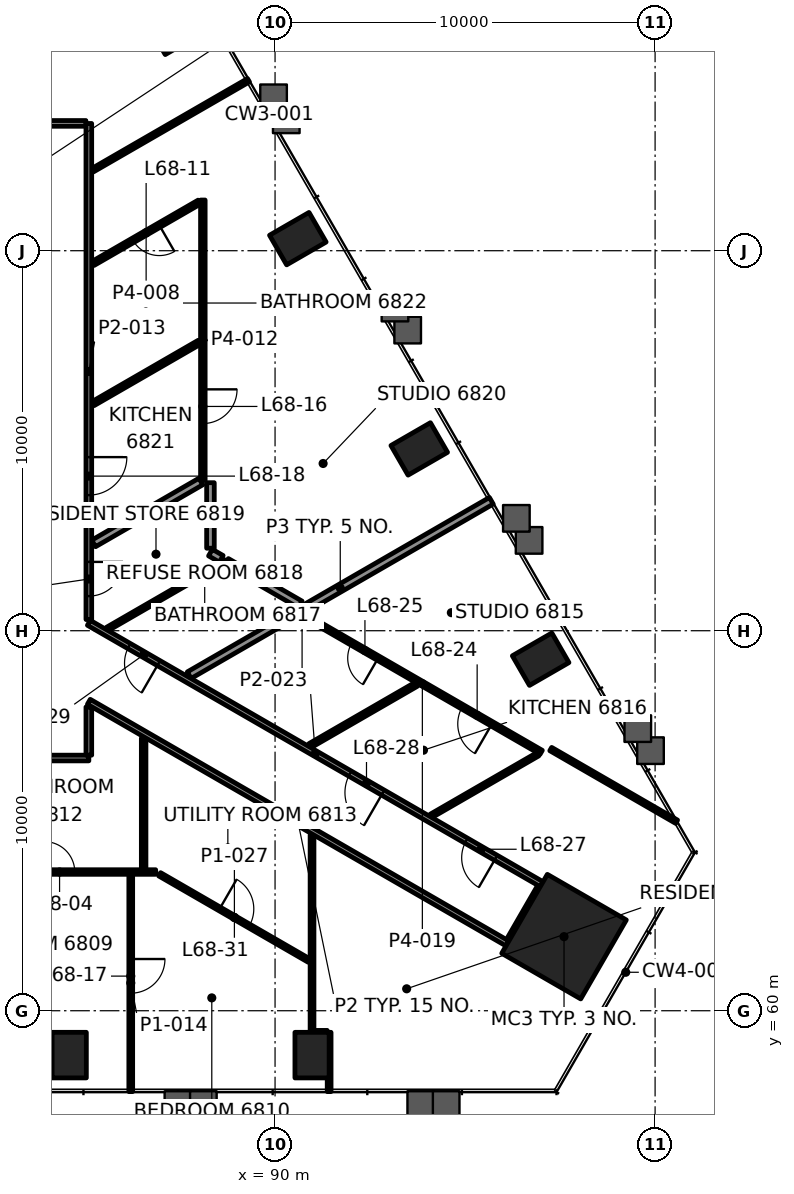
"""IFC4 building model, lengths in metres.
Left out: names, types, materials, properties, quantities, classifications, styles, units other than length and angle.
Written with IfcOpenShell. Run it as: python <this file> out.ifc"""

import sys

from ifc_helpers import new_model, si_unit, direction, frame, frame_2d, origin, origin_2d, place, context, subcontext, project, spatial, rectangle, hollow_rectangle, extrude, element, fill, save


model = new_model("IFC4")
c1 = context("Model", 3, precision=1e-05, world=origin(), true_north=direction((0.0, 1.0)))
c2 = subcontext(c1, "Body", "Model", "MODEL_VIEW")
j1 = project(units=[si_unit("LENGTHUNIT", "METRE"), si_unit("PLANEANGLEUNIT", "RADIAN")], contexts=[c1])
p1 = place(None, origin())
s1 = spatial("IfcSite", under=j1, at=p1, CompositionType="ELEMENT")
p2 = place(p1, origin())
s2 = spatial("IfcBuilding", under=s1, at=p2, CompositionType="ELEMENT")
p3 = place(p2, frame((0.0, 0.0, 284.6)))
s3 = spatial("IfcBuildingStorey", under=s2, at=p3, CompositionType="ELEMENT", Elevation=284.6)
p4 = place(p3, frame((97.604, 61.95, 0.0), z_axis=(0.0, 0.0, 1.0), x_axis=(0.5, 0.866025403784, 0.0)))
e1 = element("IfcColumn", 1, at=p4, inside=s3, PredefinedType="COLUMN", context=c2, shape_type="SweptSolid", body=[
    extrude(rectangle(XDim=2.4, YDim=2.4, at=origin_2d()), origin(), (0.0, 0.0, 1.0), 3.5),
])
for number, where, z_axis, x_axis in (
    (2, (84.584, 58.832, -0.0), (0.0, 0.0, 1.0), (1.0, 0.0, 0.0)),
    (3, (90.973, 58.832, -0.0), (0.0, 0.0, 1.0), (1.0, 0.0, 0.0)),
    (4, (96.989, 69.251, -0.0), (0.0, 0.0, 1.0), (-0.5, 0.866, 0.0)),
    (5, (93.794, 74.784, -0.0), (0.0, 0.0, 1.0), (-0.5, 0.866, 0.0)),
    (6, (90.599, 80.317, -0.0), (0.0, 0.0, 1.0), (-0.5, 0.866, 0.0)),
    (7, (87.405, 85.851, -0.0), (0.0, 0.0, 1.0), (-0.5, 0.866, 0.0)),
):
    element("IfcColumn", number, at=place(p3, frame(where, z_axis=z_axis, x_axis=x_axis)), inside=s3, PredefinedType="COLUMN", context=c2, shape_type="SweptSolid", body=[
        extrude(hollow_rectangle(XDim=0.9, YDim=1.2, WallThickness=0.06, at=origin_2d()), origin(), (0.0, 0.0, 1.0), 3.5),
    ])
p5 = place(p3, frame((91.023, 59.432, 0.0), z_axis=(0.0, 0.0, 1.0), x_axis=(1.0, 0.0, 0.0)))
e8 = element("IfcWall", 8, at=p5, inside=s3, PredefinedType="PARTITIONING", context=c2, shape_type="SweptSolid", body=[
    extrude(rectangle(XDim=0.349, YDim=0.1, at=frame_2d((0.175, 0.0))), origin(), (0.0, 0.0, 1.0), 2.7),
])
p6 = place(p3, frame((73.935, 63.65, 0.0), z_axis=(0.0, 0.0, 1.0), x_axis=(1.0, 0.0, 0.0)))
e9 = element("IfcWall", 9, at=p6, inside=s3, PredefinedType="PARTITIONING", context=c2, shape_type="SweptSolid", body=[
    extrude(rectangle(XDim=12.924, YDim=0.12, at=frame_2d((6.462, 0.0))), origin(), (0.0, 0.0, 1.0), 2.7),
])
p7 = place(p6, frame((6.197, 0.0, 0.0)))
e10 = element("IfcOpeningElement", 10, at=p7, cuts=e9, PredefinedType="OPENING", context=c2, shape_type="SweptSolid", body=[
    extrude(rectangle(XDim=0.9, YDim=2.1, at=frame_2d((0.45, 1.05))), frame((0.0, 0.07, 0.0), z_axis=(0.0, -1.0, 0.0), x_axis=(1.0, 0.0, 0.0)), (0.0, 0.0, 1.0), 0.14),
])
p8 = place(p6, frame((9.995, 0.0, 0.0)))
e11 = element("IfcOpeningElement", 11, at=p8, cuts=e9, PredefinedType="OPENING", context=c2, shape_type="SweptSolid", body=[
    extrude(rectangle(XDim=0.8, YDim=2.1, at=frame_2d((0.4, 1.05))), frame((0.0, 0.07, 0.0), z_axis=(0.0, -1.0, 0.0), x_axis=(1.0, 0.0, 0.0)), (0.0, 0.0, 1.0), 0.14),
])
p9 = place(p3, frame((85.1, 66.65, 0.0), z_axis=(0.0, 0.0, 1.0), x_axis=(-1.0, 0.0, 0.0)))
e12 = element("IfcWall", 12, at=p9, inside=s3, PredefinedType="PARTITIONING", context=c2, shape_type="SweptSolid", body=[
    extrude(rectangle(XDim=20.2, YDim=0.15, at=frame_2d((10.1, 0.0))), origin(), (0.0, 0.0, 1.0), 2.7),
])
p10 = place(p9, frame((6.405, 0.0, 0.0)))
e13 = element("IfcOpeningElement", 13, at=p10, cuts=e12, PredefinedType="OPENING", context=c2, shape_type="SweptSolid", body=[
    extrude(rectangle(XDim=1.0, YDim=2.1, at=frame_2d((0.5, 1.05))), frame((0.0, 0.085, 0.0), z_axis=(0.0, -1.0, 0.0), x_axis=(1.0, 0.0, 0.0)), (0.0, 0.0, 1.0), 0.17),
])
p11 = place(p9, frame((12.845, 0.0, 0.0)))
e14 = element("IfcOpeningElement", 14, at=p11, cuts=e12, PredefinedType="OPENING", context=c2, shape_type="SweptSolid", body=[
    extrude(rectangle(XDim=0.9, YDim=2.1, at=frame_2d((0.45, 1.05))), frame((0.0, 0.085, 0.0), z_axis=(0.0, -1.0, 0.0), x_axis=(1.0, 0.0, 0.0)), (0.0, 0.0, 1.0), 0.17),
])
p12 = place(p3, frame((78.2, 83.35, 0.0), z_axis=(0.0, 0.0, 1.0), x_axis=(1.0, 0.0, 0.0)))
e15 = element("IfcWall", 15, at=p12, inside=s3, PredefinedType="PARTITIONING", context=c2, shape_type="SweptSolid", body=[
    extrude(rectangle(XDim=6.823, YDim=0.15, at=frame_2d((3.412, 0.0))), origin(), (0.0, 0.0, 1.0), 2.7),
])
p13 = place(p12, frame((2.961, 0.0, 0.0)))
e16 = element("IfcOpeningElement", 16, at=p13, cuts=e15, PredefinedType="OPENING", context=c2, shape_type="SweptSolid", body=[
    extrude(rectangle(XDim=0.9, YDim=2.1, at=frame_2d((0.45, 1.05))), frame((0.0, 0.085, 0.0), z_axis=(0.0, -1.0, 0.0), x_axis=(1.0, 0.0, 0.0)), (0.0, 0.0, 1.0), 0.17),
])
p14 = place(p3, frame((94.104, 65.126, 0.0), z_axis=(0.0, 0.0, 1.0), x_axis=(0.866000336211, 0.500043415797, 0.0)))
e17 = element("IfcWall", 17, at=p14, inside=s3, PredefinedType="PARTITIONING", context=c2, shape_type="SweptSolid", body=[
    extrude(rectangle(XDim=3.248, YDim=0.1, at=frame_2d((1.624, 0.0))), origin(), (0.0, 0.0, 1.0), 2.7),
])
p15 = place(p3, frame((90.918, 66.975, 0.0), z_axis=(0.0, 0.0, 1.0), x_axis=(0.86605210011, 0.499953757757, 0.0)))
e18 = element("IfcWall", 18, at=p15, inside=s3, PredefinedType="PARTITIONING", context=c2, shape_type="SweptSolid", body=[
    extrude(rectangle(XDim=3.228, YDim=0.12, at=frame_2d((1.614, 0.0))), origin(), (0.0, 0.0, 1.0), 2.7),
])
p16 = place(p3, frame((87.741, 68.83, 0.0), z_axis=(0.0, 0.0, 1.0), x_axis=(0.866026579827, 0.499997963029, 0.0)))
e19 = element("IfcWall", 19, at=p16, inside=s3, PredefinedType="PARTITIONING", context=c2, shape_type="SweptSolid", body=[
    extrude(rectangle(XDim=9.179, YDim=0.2, at=frame_2d((4.59, 0.0))), origin(), (0.0, 0.0, 1.0), 2.688),
])
p17 = place(p3, frame((85.585, 70.045, 0.0), z_axis=(0.0, 0.0, 1.0), x_axis=(0.866004928679, 0.500035462246, 0.0)))
e20 = element("IfcWall", 20, at=p17, inside=s3, PredefinedType="PARTITIONING", context=c2, shape_type="SweptSolid", body=[
    extrude(rectangle(XDim=3.578, YDim=0.1, at=frame_2d((1.789, 0.0))), origin(), (0.0, 0.0, 1.0), 2.7),
])
p18 = place(p3, frame((85.227, 72.297, 0.0), z_axis=(0.0, 0.0, 1.0), x_axis=(0.866002113569, 0.500040337666, 0.0)))
e21 = element("IfcWall", 21, at=p18, inside=s3, PredefinedType="PARTITIONING", context=c2, shape_type="SweptSolid", body=[
    extrude(rectangle(XDim=3.258, YDim=0.2, at=frame_2d((1.629, 0.0))), origin(), (0.0, 0.0, 1.0), 2.7),
])
p19 = place(p3, frame((85.21, 75.976, 0.0), z_axis=(0.0, 0.0, 1.0), x_axis=(0.86605210011, 0.499953757757, 0.0)))
e22 = element("IfcWall", 22, at=p19, inside=s3, PredefinedType="PARTITIONING", context=c2, shape_type="SweptSolid", body=[
    extrude(rectangle(XDim=3.228, YDim=0.12, at=frame_2d((1.614, 0.0))), origin(), (0.0, 0.0, 1.0), 2.7),
])
p20 = place(p3, frame((88.005, 81.279, 0.0), z_axis=(0.0, 0.0, 1.0), x_axis=(-0.866000447062, -0.500043223821, 0.0)))
e23 = element("IfcWall", 23, at=p20, inside=s3, PredefinedType="PARTITIONING", context=c2, shape_type="SweptSolid", body=[
    extrude(rectangle(XDim=3.228, YDim=0.12, at=frame_2d((1.614, 0.0))), origin(), (0.0, 0.0, 1.0), 2.7),
])
p21 = place(p20, frame((1.214, 0.0, 0.0)))
e24 = element("IfcOpeningElement", 24, at=p21, cuts=e23, PredefinedType="OPENING", context=c2, shape_type="SweptSolid", body=[
    extrude(rectangle(XDim=0.8, YDim=2.1, at=frame_2d((0.4, 1.05))), frame((0.0, 0.07, 0.0), z_axis=(0.0, -1.0, 0.0), x_axis=(1.0, 0.0, 0.0)), (0.0, 0.0, 1.0), 0.14),
])
p22 = place(p3, frame((85.201, 82.119, 0.0), z_axis=(0.0, 0.0, 1.0), x_axis=(0.866035297817, 0.499982862641, 0.0)))
e25 = element("IfcWall", 25, at=p22, inside=s3, PredefinedType="PARTITIONING", context=c2, shape_type="SweptSolid", body=[
    extrude(rectangle(XDim=4.734, YDim=0.1, at=frame_2d((2.367, 0.0))), origin(), (0.0, 0.0, 1.0), 2.688),
])
p23 = place(p3, frame((96.153, 61.835, 0.0), z_axis=(0.0, 0.0, 1.0), x_axis=(0.500008692254, 0.866020385251, 0.0)))
e26 = element("IfcWall", 26, at=p23, inside=s3, PredefinedType="PARTITIONING", context=c2, shape_type="SweptSolid", body=[
    extrude(rectangle(XDim=1.649, YDim=0.15, at=frame_2d((0.824, 0.0))), origin(), (0.0, 0.0, 1.0), 2.547),
])
p24 = place(p3, frame((91.423, 57.872, 0.0), z_axis=(0.0, 0.0, 1.0), x_axis=(0.0, 1.0, 0.0)))
e27 = element("IfcWall", 27, at=p24, inside=s3, PredefinedType="PARTITIONING", context=c2, shape_type="SweptSolid", body=[
    extrude(rectangle(XDim=1.559, YDim=0.1, at=frame_2d((0.78, 0.0))), origin(), (0.0, 0.0, 1.0), 2.7),
])
p25 = place(p3, frame((90.973, 59.432, 0.0), z_axis=(0.0, 0.0, 1.0), x_axis=(0.0, 1.0, 0.0)))
e28 = element("IfcWall", 28, at=p25, inside=s3, PredefinedType="PARTITIONING", context=c2, shape_type="SweptSolid", body=[
    extrude(rectangle(XDim=5.19, YDim=0.1, at=frame_2d((2.595, 0.0))), origin(), (0.0, 0.0, 1.0), 2.7),
])
p26 = place(p3, frame((88.3, 72.171, 0.0), z_axis=(0.0, 0.0, 1.0), x_axis=(0.0, 1.0, 0.0)))
e29 = element("IfcWall", 29, at=p26, inside=s3, PredefinedType="PARTITIONING", context=c2, shape_type="SweptSolid", body=[
    extrude(rectangle(XDim=1.724, YDim=0.2, at=frame_2d((0.862, 0.0))), origin(), (0.0, 0.0, 1.0), 2.7),
])
p27 = place(p3, frame((88.1, 81.334, 0.0), z_axis=(0.0, 0.0, 1.0), x_axis=(0.0, -1.0, 0.0)))
e30 = element("IfcWall", 30, at=p27, inside=s3, PredefinedType="PARTITIONING", context=c2, shape_type="SweptSolid", body=[
    extrude(rectangle(XDim=7.378, YDim=0.12, at=frame_2d((3.689, 0.0))), origin(), (0.0, 0.0, 1.0), 2.7),
])
p28 = place(p27, frame((4.982, 0.0, 0.0)))
e31 = element("IfcOpeningElement", 31, at=p28, cuts=e30, PredefinedType="OPENING", context=c2, shape_type="SweptSolid", body=[
    extrude(rectangle(XDim=0.9, YDim=2.1, at=frame_2d((0.45, 1.05))), frame((0.0, 0.07, 0.0), z_axis=(0.0, -1.0, 0.0), x_axis=(1.0, 0.0, 0.0)), (0.0, 0.0, 1.0), 0.14),
])
p29 = place(p3, frame((86.542, 63.71, 0.0), z_axis=(0.0, 0.0, 1.0), x_axis=(0.0, 1.0, 0.0)))
e32 = element("IfcWall", 32, at=p29, inside=s3, PredefinedType="PARTITIONING", context=c2, shape_type="SweptSolid", body=[
    extrude(rectangle(XDim=3.46, YDim=0.12, at=frame_2d((1.73, 0.0))), origin(), (0.0, 0.0, 1.0), 2.547),
])
p30 = place(p3, frame((86.203, 63.59, 0.0), z_axis=(0.0, 0.0, 1.0), x_axis=(0.0, -1.0, 0.0)))
e33 = element("IfcWall", 33, at=p30, inside=s3, PredefinedType="PARTITIONING", context=c2, shape_type="SweptSolid", body=[
    extrude(rectangle(XDim=5.718, YDim=0.1, at=frame_2d((2.859, 0.0))), origin(), (0.0, 0.0, 1.0), 2.7),
])
p31 = place(p30, frame((2.229, 0.0, 0.0)))
e34 = element("IfcOpeningElement", 34, at=p31, cuts=e33, PredefinedType="OPENING", context=c2, shape_type="SweptSolid", body=[
    extrude(rectangle(XDim=0.9, YDim=2.1, at=frame_2d((0.45, 1.05))), frame((0.0, 0.06, 0.0), z_axis=(0.0, -1.0, 0.0), x_axis=(1.0, 0.0, 0.0)), (0.0, 0.0, 1.0), 0.12),
])
p32 = place(p3, frame((85.1, 66.725, 0.0), z_axis=(0.0, 0.0, 1.0), x_axis=(0.0, 1.0, 0.0)))
e35 = element("IfcWall", 35, at=p32, inside=s3, PredefinedType="PARTITIONING", context=c2, shape_type="SweptSolid", body=[
    extrude(rectangle(XDim=1.268, YDim=0.15, at=frame_2d((0.634, 0.0))), origin(), (0.0, 0.0, 1.0), 2.547),
])
p33 = place(p3, frame((85.1, 83.348, 0.0), z_axis=(0.0, 0.0, 1.0), x_axis=(0.0, -1.0, 0.0)))
e36 = element("IfcWall", 36, at=p33, inside=s3, PredefinedType="PARTITIONING", context=c2, shape_type="SweptSolid", body=[
    extrude(rectangle(XDim=13.053, YDim=0.15, at=frame_2d((6.527, 0.0))), origin(), (0.0, 0.0, 1.0), 2.7),
])
p34 = place(p33, frame((8.78, 0.0, 0.0)))
e37 = element("IfcOpeningElement", 37, at=p34, cuts=e36, PredefinedType="OPENING", context=c2, shape_type="SweptSolid", body=[
    extrude(rectangle(XDim=1.0, YDim=2.1, at=frame_2d((0.5, 1.05))), frame((0.0, 0.085, 0.0), z_axis=(0.0, -1.0, 0.0), x_axis=(1.0, 0.0, 0.0)), (0.0, 0.0, 1.0), 0.17),
])
p35 = place(p33, frame((11.537, 0.0, 0.0)))
e38 = element("IfcOpeningElement", 38, at=p35, cuts=e36, PredefinedType="OPENING", context=c2, shape_type="SweptSolid", body=[
    extrude(rectangle(XDim=0.9, YDim=2.1, at=frame_2d((0.45, 1.05))), frame((0.0, 0.085, 0.0), z_axis=(0.0, -1.0, 0.0), x_axis=(1.0, 0.0, 0.0)), (0.0, 0.0, 1.0), 0.17),
])
p36 = place(p3, frame((100.566, 64.974, 0.0), z_axis=(0.0, 0.0, 1.0), x_axis=(-0.8660389038, 0.499976616558, 0.0)))
e39 = element("IfcWall", 39, at=p36, inside=s3, PredefinedType="PARTITIONING", context=c2, shape_type="SweptSolid", body=[
    extrude(rectangle(XDim=3.825, YDim=0.1, at=frame_2d((1.913, 0.0))), origin(), (0.0, 0.0, 1.0), 2.7),
])
p37 = place(p3, frame((90.662, 70.692, 0.0), z_axis=(0.0, 0.0, 1.0), x_axis=(-0.866034963436, 0.499983441833, 0.0)))
e40 = element("IfcWall", 40, at=p37, inside=s3, PredefinedType="PARTITIONING", context=c2, shape_type="SweptSolid", body=[
    extrude(rectangle(XDim=2.24, YDim=0.2, at=frame_2d((1.12, 0.0))), origin(), (0.0, 0.0, 1.0), 2.7),
])
p38 = place(p3, frame((97.003, 66.8, 0.0), z_axis=(0.0, 0.0, 1.0), x_axis=(-0.866012764826, 0.500021890679, 0.0)))
e41 = element("IfcWall", 41, at=p38, inside=s3, PredefinedType="PARTITIONING", context=c2, shape_type="SweptSolid", body=[
    extrude(rectangle(XDim=7.222, YDim=0.12, at=frame_2d((3.611, 0.0))), origin(), (0.0, 0.0, 1.0), 2.7),
])
p39 = place(p38, frame((1.496, 0.0, 0.0)))
e42 = element("IfcOpeningElement", 42, at=p39, cuts=e41, PredefinedType="OPENING", context=c2, shape_type="SweptSolid", body=[
    extrude(rectangle(XDim=0.9, YDim=2.1, at=frame_2d((0.45, 1.05))), frame((0.0, 0.07, 0.0), z_axis=(0.0, -1.0, 0.0), x_axis=(1.0, 0.0, 0.0)), (0.0, 0.0, 1.0), 0.14),
])
p40 = place(p38, frame((4.956, 0.0, 0.0)))
e43 = element("IfcOpeningElement", 43, at=p40, cuts=e41, PredefinedType="OPENING", context=c2, shape_type="SweptSolid", body=[
    extrude(rectangle(XDim=0.8, YDim=2.1, at=frame_2d((0.4, 1.05))), frame((0.0, 0.07, 0.0), z_axis=(0.0, -1.0, 0.0), x_axis=(1.0, 0.0, 0.0)), (0.0, 0.0, 1.0), 0.14),
])
p41 = place(p3, frame((97.014, 63.329, 0.0), z_axis=(0.0, 0.0, 1.0), x_axis=(-0.866023045711, 0.500004084281, 0.0)))
e44 = element("IfcWall", 44, at=p41, inside=s3, PredefinedType="PARTITIONING", context=c2, shape_type="SweptSolid", body=[
    extrude(rectangle(XDim=13.757, YDim=0.15, at=frame_2d((6.879, 0.0))), origin(), (0.0, 0.0, 1.0), 2.7),
])
p42 = place(p41, frame((1.39, 0.0, 0.0)))
e45 = element("IfcOpeningElement", 45, at=p42, cuts=e44, PredefinedType="OPENING", context=c2, shape_type="SweptSolid", body=[
    extrude(rectangle(XDim=0.9, YDim=2.1, at=frame_2d((0.45, 1.05))), frame((0.0, 0.085, 0.0), z_axis=(0.0, -1.0, 0.0), x_axis=(1.0, 0.0, 0.0)), (0.0, 0.0, 1.0), 0.17),
])
p43 = place(p41, frame((4.821, 0.0, 0.0)))
e46 = element("IfcOpeningElement", 46, at=p43, cuts=e44, PredefinedType="OPENING", context=c2, shape_type="SweptSolid", body=[
    extrude(rectangle(XDim=1.0, YDim=2.1, at=frame_2d((0.5, 1.05))), frame((0.0, 0.085, 0.0), z_axis=(0.0, -1.0, 0.0), x_axis=(1.0, 0.0, 0.0)), (0.0, 0.0, 1.0), 0.17),
])
p44 = place(p41, frame((11.634, 0.0, 0.0)))
e47 = element("IfcOpeningElement", 47, at=p44, cuts=e44, PredefinedType="OPENING", context=c2, shape_type="SweptSolid", body=[
    extrude(rectangle(XDim=0.9, YDim=2.1, at=frame_2d((0.45, 1.05))), frame((0.0, 0.085, 0.0), z_axis=(0.0, -1.0, 0.0), x_axis=(1.0, 0.0, 0.0)), (0.0, 0.0, 1.0), 0.17),
])
p45 = place(p3, frame((96.114, 61.771, 0.0), z_axis=(0.0, 0.0, 1.0), x_axis=(-0.866021912989, 0.500006046186, 0.0)))
e48 = element("IfcWall", 48, at=p45, inside=s3, PredefinedType="PARTITIONING", context=c2, shape_type="SweptSolid", body=[
    extrude(rectangle(XDim=12.718, YDim=0.15, at=frame_2d((6.359, 0.0))), origin(), (0.0, 0.0, 1.0), 2.547),
])
p46 = place(p3, frame((86.963, 63.59, 0.0), z_axis=(0.0, 0.0, 1.0), x_axis=(0.866028993663, -0.499993782096, 0.0)))
e49 = element("IfcWall", 49, at=p46, inside=s3, PredefinedType="PARTITIONING", context=c2, shape_type="SweptSolid", body=[
    extrude(rectangle(XDim=4.543, YDim=0.1, at=frame_2d((2.272, 0.0))), origin(), (0.0, 0.0, 1.0), 2.7),
])
p47 = place(p46, frame((1.822, 0.0, 0.0)))
e50 = element("IfcOpeningElement", 50, at=p47, cuts=e49, PredefinedType="OPENING", context=c2, shape_type="SweptSolid", body=[
    extrude(rectangle(XDim=0.9, YDim=2.1, at=frame_2d((0.45, 1.05))), frame((0.0, 0.06, 0.0), z_axis=(0.0, -1.0, 0.0), x_axis=(1.0, 0.0, 0.0)), (0.0, 0.0, 1.0), 0.12),
])
p48 = place(p3, frame((88.584, 71.892, 0.0), z_axis=(0.0, 0.0, 1.0), x_axis=(-0.865987003449, 0.500066505434, 0.0)))
e51 = element("IfcWall", 51, at=p48, inside=s3, PredefinedType="PARTITIONING", context=c2, shape_type="SweptSolid", body=[
    extrude(rectangle(XDim=0.328, YDim=0.2, at=frame_2d((0.164, 0.0))), origin(), (0.0, 0.0, 1.0), 2.7),
])
p49 = place(p8, origin())
e52 = element("IfcDoor", 52, at=p49, inside=s3, OperationType="SINGLE_SWING_LEFT", PredefinedType="DOOR", context=c2, shape_type="SweptSolid", body=[
    extrude(rectangle(XDim=0.8, YDim=2.1, at=frame_2d((0.4, 1.05))), frame((0.0, 0.025, 0.0), z_axis=(0.0, -1.0, 0.0), x_axis=(1.0, 0.0, 0.0)), (0.0, 0.0, 1.0), 0.05),
])
fill(e11, e52)
p50 = place(p21, origin())
e53 = element("IfcDoor", 53, at=p50, inside=s3, OperationType="SINGLE_SWING_RIGHT", PredefinedType="DOOR", context=c2, shape_type="SweptSolid", body=[
    extrude(rectangle(XDim=0.8, YDim=2.1, at=frame_2d((0.4, 1.05))), frame((0.0, 0.025, 0.0), z_axis=(0.0, -1.0, 0.0), x_axis=(1.0, 0.0, 0.0)), (0.0, 0.0, 1.0), 0.05),
])
fill(e24, e53)
p51 = place(p28, origin())
e54 = element("IfcDoor", 54, at=p51, inside=s3, OperationType="SINGLE_SWING_RIGHT", PredefinedType="DOOR", context=c2, shape_type="SweptSolid", body=[
    extrude(rectangle(XDim=0.9, YDim=2.1, at=frame_2d((0.45, 1.05))), frame((0.0, 0.025, 0.0), z_axis=(0.0, -1.0, 0.0), x_axis=(1.0, 0.0, 0.0)), (0.0, 0.0, 1.0), 0.05),
])
fill(e31, e54)
p52 = place(p31, origin())
e55 = element("IfcDoor", 55, at=p52, inside=s3, OperationType="SINGLE_SWING_LEFT", PredefinedType="DOOR", context=c2, shape_type="SweptSolid", body=[
    extrude(rectangle(XDim=0.9, YDim=2.1, at=frame_2d((0.45, 1.05))), frame((0.0, 0.025, 0.0), z_axis=(0.0, -1.0, 0.0), x_axis=(1.0, 0.0, 0.0)), (0.0, 0.0, 1.0), 0.05),
])
fill(e34, e55)
p53 = place(p34, origin())
e56 = element("IfcDoor", 56, at=p53, inside=s3, OperationType="SINGLE_SWING_LEFT", PredefinedType="DOOR", context=c2, shape_type="SweptSolid", body=[
    extrude(rectangle(XDim=1.0, YDim=2.1, at=frame_2d((0.5, 1.05))), frame((0.0, 0.025, 0.0), z_axis=(0.0, -1.0, 0.0), x_axis=(1.0, 0.0, 0.0)), (0.0, 0.0, 1.0), 0.05),
])
fill(e37, e56)
p54 = place(p35, origin())
e57 = element("IfcDoor", 57, at=p54, inside=s3, OperationType="SINGLE_SWING_LEFT", PredefinedType="DOOR", context=c2, shape_type="SweptSolid", body=[
    extrude(rectangle(XDim=0.9, YDim=2.1, at=frame_2d((0.45, 1.05))), frame((0.0, 0.025, 0.0), z_axis=(0.0, -1.0, 0.0), x_axis=(1.0, 0.0, 0.0)), (0.0, 0.0, 1.0), 0.05),
])
fill(e38, e57)
p55 = place(p39, origin())
e58 = element("IfcDoor", 58, at=p55, inside=s3, OperationType="SINGLE_SWING_RIGHT", PredefinedType="DOOR", context=c2, shape_type="SweptSolid", body=[
    extrude(rectangle(XDim=0.9, YDim=2.1, at=frame_2d((0.45, 1.05))), frame((0.0, 0.025, 0.0), z_axis=(0.0, -1.0, 0.0), x_axis=(1.0, 0.0, 0.0)), (0.0, 0.0, 1.0), 0.05),
])
fill(e42, e58)
p56 = place(p40, origin())
e59 = element("IfcDoor", 59, at=p56, inside=s3, OperationType="SINGLE_SWING_RIGHT", PredefinedType="DOOR", context=c2, shape_type="SweptSolid", body=[
    extrude(rectangle(XDim=0.8, YDim=2.1, at=frame_2d((0.4, 1.05))), frame((0.0, 0.025, 0.0), z_axis=(0.0, -1.0, 0.0), x_axis=(1.0, 0.0, 0.0)), (0.0, 0.0, 1.0), 0.05),
])
fill(e43, e59)
p57 = place(p42, origin())
e60 = element("IfcDoor", 60, at=p57, inside=s3, OperationType="SINGLE_SWING_LEFT", PredefinedType="DOOR", context=c2, shape_type="SweptSolid", body=[
    extrude(rectangle(XDim=0.9, YDim=2.1, at=frame_2d((0.45, 1.05))), frame((0.0, 0.025, 0.0), z_axis=(0.0, -1.0, 0.0), x_axis=(1.0, 0.0, 0.0)), (0.0, 0.0, 1.0), 0.05),
])
fill(e45, e60)
p58 = place(p43, origin())
e61 = element("IfcDoor", 61, at=p58, inside=s3, OperationType="SINGLE_SWING_LEFT", PredefinedType="DOOR", context=c2, shape_type="SweptSolid", body=[
    extrude(rectangle(XDim=1.0, YDim=2.1, at=frame_2d((0.5, 1.05))), frame((0.0, 0.025, 0.0), z_axis=(0.0, -1.0, 0.0), x_axis=(1.0, 0.0, 0.0)), (0.0, 0.0, 1.0), 0.05),
])
fill(e46, e61)
p59 = place(p44, origin())
e62 = element("IfcDoor", 62, at=p59, inside=s3, OperationType="SINGLE_SWING_LEFT", PredefinedType="DOOR", context=c2, shape_type="SweptSolid", body=[
    extrude(rectangle(XDim=0.9, YDim=2.1, at=frame_2d((0.45, 1.05))), frame((0.0, 0.025, 0.0), z_axis=(0.0, -1.0, 0.0), x_axis=(1.0, 0.0, 0.0)), (0.0, 0.0, 1.0), 0.05),
])
fill(e47, e62)
p60 = place(p47, origin())
e63 = element("IfcDoor", 63, at=p60, inside=s3, OperationType="SINGLE_SWING_LEFT", PredefinedType="DOOR", context=c2, shape_type="SweptSolid", body=[
    extrude(rectangle(XDim=0.9, YDim=2.1, at=frame_2d((0.45, 1.05))), frame((0.0, 0.025, 0.0), z_axis=(0.0, -1.0, 0.0), x_axis=(1.0, 0.0, 0.0)), (0.0, 0.0, 1.0), 0.05),
])
fill(e50, e63)
save(model, sys.argv[1])
